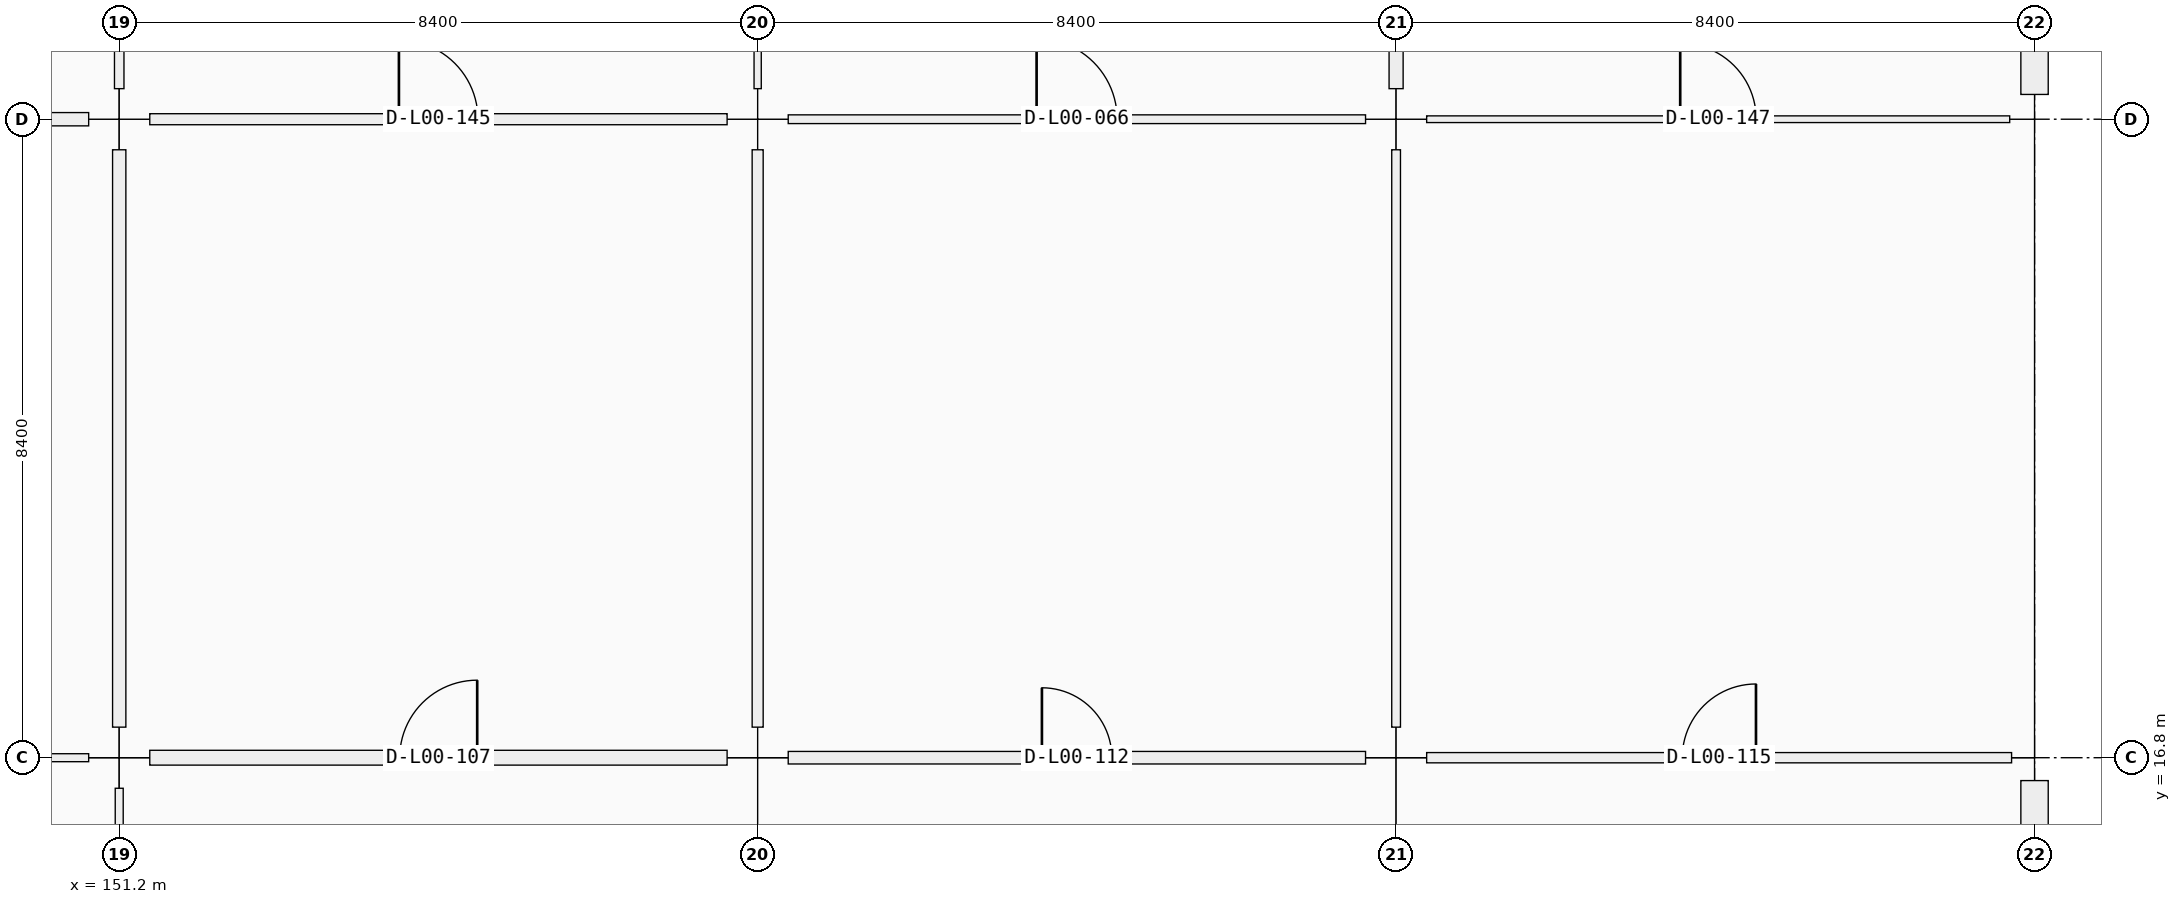
"""IFC4 building model, lengths in metres.
Left out: names, types, materials, properties, quantities, classifications, styles, units other than length and angle.
Written with IfcOpenShell. Run it as: python <this file> out.ifc"""

import sys

from ifc_helpers import new_model, si_unit, direction, frame, frame_2d, origin, origin_2d, place, context, subcontext, project, spatial, rectangle, extrude, element, fill, save


model = new_model("IFC4")
c1 = context("Model", 3, precision=1e-05, world=origin(), true_north=direction((0.0, 1.0)))
c2 = subcontext(c1, "Body", "Model", "MODEL_VIEW")
j1 = project(units=[si_unit("LENGTHUNIT", "METRE"), si_unit("PLANEANGLEUNIT", "RADIAN")], contexts=[c1])
p1 = place(None, origin())
s1 = spatial("IfcSite", under=j1, at=p1, CompositionType="ELEMENT")
p2 = place(p1, origin())
s2 = spatial("IfcBuilding", under=s1, at=p2, CompositionType="ELEMENT")
p3 = place(p2, origin())
s3 = spatial("IfcBuildingStorey", under=s2, at=p3, CompositionType="ELEMENT", Elevation=0.0)
for number, where, z_axis, x_axis in (
    (1, (151.2, 16.8, 0.0), (0.0, 0.0, 1.0), (1.0, 0.0, 0.0)),
    (2, (151.2, 25.2, 0.0), (0.0, 0.0, 1.0), (1.0, 0.0, 0.0)),
    (3, (159.6, 16.8, 0.0), (0.0, 0.0, 1.0), (1.0, 0.0, 0.0)),
    (4, (159.6, 25.2, 0.0), (0.0, 0.0, 1.0), (1.0, 0.0, 0.0)),
    (5, (168.0, 16.8, 0.0), (0.0, 0.0, 1.0), (1.0, 0.0, 0.0)),
    (6, (168.0, 25.2, 0.0), (0.0, 0.0, 1.0), (1.0, 0.0, 0.0)),
):
    element("IfcColumn", number, at=place(p3, frame(where, z_axis=z_axis, x_axis=x_axis)), inside=s3, PredefinedType="COLUMN", context=c2, shape_type="SweptSolid", body=[
        extrude(rectangle(XDim=0.8, YDim=0.8, at=origin_2d()), origin(), (0.0, 0.0, 1.0), 5.76),
    ])
p4 = place(p3, frame((176.4, 16.8, 0.0), z_axis=(0.0, 0.0, 1.0), x_axis=(1.0, 0.0, 0.0)))
e7 = element("IfcColumn", 7, at=p4, inside=s3, PredefinedType="COLUMN", context=c2, shape_type="SweptSolid", body=[
    extrude(rectangle(XDim=0.6, YDim=0.6, at=origin_2d()), origin(), (0.0, 0.0, 1.0), 5.76),
])
p5 = place(p3, frame((176.4, 25.2, 0.0), z_axis=(0.0, 0.0, 1.0), x_axis=(1.0, 0.0, 0.0)))
e8 = element("IfcColumn", 8, at=p5, inside=s3, PredefinedType="COLUMN", context=c2, shape_type="SweptSolid", body=[
    extrude(rectangle(XDim=0.65, YDim=0.65, at=origin_2d()), origin(), (0.0, 0.0, 1.0), 5.76),
])
p6 = place(p3, frame((176.4, 16.499, 0.0), z_axis=(0.0, 0.0, 1.0), x_axis=(0.0, -1.0, 0.0)))
e9 = element("IfcWall", 9, at=p6, inside=s3, PredefinedType="SOLIDWALL", context=c2, shape_type="SweptSolid", body=[
    extrude(rectangle(XDim=7.773, YDim=0.36, at=frame_2d((3.886, 0.0))), origin(), (0.0, 0.0, 1.0), 4.7),
])
p7 = place(p6, frame((2.886, 0.0, 0.9)))
e10 = element("IfcOpeningElement", 10, at=p7, cuts=e9, PredefinedType="OPENING", context=c2, shape_type="SweptSolid", body=[
    extrude(rectangle(XDim=2.0, YDim=2.1, at=frame_2d((1.0, 1.05))), frame((0.0, 0.18, 0.0), z_axis=(0.0, -1.0, 0.0), x_axis=(1.0, 0.0, 0.0)), (0.0, 0.0, 1.0), 0.36),
])
p8 = place(p3, frame((176.4, 33.299, 0.0), z_axis=(0.0, 0.0, 1.0), x_axis=(0.0, -1.0, 0.0)))
e11 = element("IfcWall", 11, at=p8, inside=s3, PredefinedType="SOLIDWALL", context=c2, shape_type="SweptSolid", body=[
    extrude(rectangle(XDim=7.773, YDim=0.36, at=frame_2d((3.887, 0.0))), origin(), (0.0, 0.0, 1.0), 4.7),
])
p9 = place(p8, frame((2.837, 0.0, 0.0)))
e12 = element("IfcOpeningElement", 12, at=p9, cuts=e11, PredefinedType="OPENING", context=c2, shape_type="SweptSolid", body=[
    extrude(rectangle(XDim=2.1, YDim=2.25, at=frame_2d((1.05, 1.125))), frame((0.0, 0.18, 0.0), z_axis=(0.0, -1.0, 0.0), x_axis=(1.0, 0.0, 0.0)), (0.0, 0.0, 1.0), 0.36),
])
p10 = place(p3, frame((143.202, 16.8, 0.0), z_axis=(0.0, 0.0, 1.0), x_axis=(1.0, 0.0, 0.0)))
e13 = element("IfcWall", 13, at=p10, inside=s3, PredefinedType="PARTITIONING", context=c2, shape_type="SweptSolid", body=[
    extrude(rectangle(XDim=7.596, YDim=0.105, at=frame_2d((3.798, 0.0))), origin(), (0.0, 0.0, 1.0), 3.66),
])
p11 = place(p10, frame((3.313, 0.0, 0.0)))
e14 = element("IfcOpeningElement", 14, at=p11, cuts=e13, PredefinedType="OPENING", context=c2, shape_type="SweptSolid", body=[
    extrude(rectangle(XDim=0.97, YDim=2.12, at=frame_2d((0.485, 1.06))), frame((0.0, 0.052, 0.0), z_axis=(0.0, -1.0, 0.0), x_axis=(1.0, 0.0, 0.0)), (0.0, 0.0, 1.0), 0.105),
])
p12 = place(p3, frame((143.202, 25.2, 0.0), z_axis=(0.0, 0.0, 1.0), x_axis=(1.0, 0.0, 0.0)))
e15 = element("IfcWall", 15, at=p12, inside=s3, PredefinedType="PARTITIONING", context=c2, shape_type="SweptSolid", body=[
    extrude(rectangle(XDim=7.596, YDim=0.175, at=frame_2d((3.798, 0.0))), origin(), (0.0, 0.0, 1.0), 3.66),
])
p13 = place(p12, frame((3.333, 0.0, 0.0)))
e16 = element("IfcOpeningElement", 16, at=p13, cuts=e15, PredefinedType="OPENING", context=c2, shape_type="SweptSolid", body=[
    extrude(rectangle(XDim=0.93, YDim=2.12, at=frame_2d((0.465, 1.06))), frame((0.0, 0.087, 0.0), z_axis=(0.0, -1.0, 0.0), x_axis=(1.0, 0.0, 0.0)), (0.0, 0.0, 1.0), 0.175),
])
p14 = place(p3, frame((151.602, 16.8, 0.0), z_axis=(0.0, 0.0, 1.0), x_axis=(1.0, 0.0, 0.0)))
e17 = element("IfcWall", 17, at=p14, inside=s3, PredefinedType="PARTITIONING", context=c2, shape_type="SweptSolid", body=[
    extrude(rectangle(XDim=7.596, YDim=0.195, at=frame_2d((3.798, 0.0))), origin(), (0.0, 0.0, 1.0), 3.66),
])
p15 = place(p14, frame((3.288, 0.0, 0.0)))
e18 = element("IfcOpeningElement", 18, at=p15, cuts=e17, PredefinedType="OPENING", context=c2, shape_type="SweptSolid", body=[
    extrude(rectangle(XDim=1.02, YDim=2.2, at=frame_2d((0.51, 1.1))), frame((0.0, 0.098, 0.0), z_axis=(0.0, -1.0, 0.0), x_axis=(1.0, 0.0, 0.0)), (0.0, 0.0, 1.0), 0.195),
])
p16 = place(p3, frame((151.602, 25.2, 0.0), z_axis=(0.0, 0.0, 1.0), x_axis=(1.0, 0.0, 0.0)))
e19 = element("IfcWall", 19, at=p16, inside=s3, PredefinedType="PARTITIONING", context=c2, shape_type="SweptSolid", body=[
    extrude(rectangle(XDim=7.596, YDim=0.145, at=frame_2d((3.798, 0.0))), origin(), (0.0, 0.0, 1.0), 3.66),
])
p17 = place(p16, frame((3.278, 0.0, 0.0)))
e20 = element("IfcOpeningElement", 20, at=p17, cuts=e19, PredefinedType="OPENING", context=c2, shape_type="SweptSolid", body=[
    extrude(rectangle(XDim=1.04, YDim=2.2, at=frame_2d((0.52, 1.1))), frame((0.0, 0.073, 0.0), z_axis=(0.0, -1.0, 0.0), x_axis=(1.0, 0.0, 0.0)), (0.0, 0.0, 1.0), 0.145),
])
p18 = place(p3, frame((160.002, 16.8, 0.0), z_axis=(0.0, 0.0, 1.0), x_axis=(1.0, 0.0, 0.0)))
e21 = element("IfcWall", 21, at=p18, inside=s3, PredefinedType="PARTITIONING", context=c2, shape_type="SweptSolid", body=[
    extrude(rectangle(XDim=7.596, YDim=0.165, at=frame_2d((3.798, 0.0))), origin(), (0.0, 0.0, 1.0), 3.66),
])
p19 = place(p18, frame((3.338, 0.0, 0.0)))
e22 = element("IfcOpeningElement", 22, at=p19, cuts=e21, PredefinedType="OPENING", context=c2, shape_type="SweptSolid", body=[
    extrude(rectangle(XDim=0.92, YDim=2.15, at=frame_2d((0.46, 1.075))), frame((0.0, 0.083, 0.0), z_axis=(0.0, -1.0, 0.0), x_axis=(1.0, 0.0, 0.0)), (0.0, 0.0, 1.0), 0.165),
])
p20 = place(p3, frame((160.002, 25.2, 0.0), z_axis=(0.0, 0.0, 1.0), x_axis=(1.0, 0.0, 0.0)))
e23 = element("IfcWall", 23, at=p20, inside=s3, PredefinedType="PARTITIONING", context=c2, shape_type="SweptSolid", body=[
    extrude(rectangle(XDim=7.596, YDim=0.115, at=frame_2d((3.798, 0.0))), origin(), (0.0, 0.0, 1.0), 3.66),
])
p21 = place(p20, frame((3.268, 0.0, 0.0)))
e24 = element("IfcOpeningElement", 24, at=p21, cuts=e23, PredefinedType="OPENING", context=c2, shape_type="SweptSolid", body=[
    extrude(rectangle(XDim=1.06, YDim=2.25, at=frame_2d((0.53, 1.125))), frame((0.0, 0.058, 0.0), z_axis=(0.0, -1.0, 0.0), x_axis=(1.0, 0.0, 0.0)), (0.0, 0.0, 1.0), 0.115),
])
p22 = place(p3, frame((168.402, 16.8, 0.0), z_axis=(0.0, 0.0, 1.0), x_axis=(1.0, 0.0, 0.0)))
e25 = element("IfcWall", 25, at=p22, inside=s3, PredefinedType="PARTITIONING", context=c2, shape_type="SweptSolid", body=[
    extrude(rectangle(XDim=7.696, YDim=0.135, at=frame_2d((3.848, 0.0))), origin(), (0.0, 0.0, 1.0), 3.66),
])
p23 = place(p22, frame((3.363, 0.0, 0.0)))
e26 = element("IfcOpeningElement", 26, at=p23, cuts=e25, PredefinedType="OPENING", context=c2, shape_type="SweptSolid", body=[
    extrude(rectangle(XDim=0.97, YDim=2.12, at=frame_2d((0.485, 1.06))), frame((0.0, 0.067, 0.0), z_axis=(0.0, -1.0, 0.0), x_axis=(1.0, 0.0, 0.0)), (0.0, 0.0, 1.0), 0.135),
])
p24 = place(p3, frame((168.402, 25.2, 0.0), z_axis=(0.0, 0.0, 1.0), x_axis=(1.0, 0.0, 0.0)))
e27 = element("IfcWall", 27, at=p24, inside=s3, PredefinedType="PARTITIONING", context=c2, shape_type="SweptSolid", body=[
    extrude(rectangle(XDim=7.671, YDim=0.088, at=frame_2d((3.835, 0.0))), origin(), (0.0, 0.0, 1.0), 3.66),
])
p25 = place(p24, frame((3.336, 0.0, 0.0)))
e28 = element("IfcOpeningElement", 28, at=p25, cuts=e27, PredefinedType="OPENING", context=c2, shape_type="SweptSolid", body=[
    extrude(rectangle(XDim=1.0, YDim=2.2, at=frame_2d((0.5, 1.1))), frame((0.0, 0.044, 0.0), z_axis=(0.0, -1.0, 0.0), x_axis=(1.0, 0.0, 0.0)), (0.0, 0.0, 1.0), 0.088),
])
p26 = place(p3, frame((151.2, 8.752, 0.0), z_axis=(0.0, 0.0, 1.0), x_axis=(0.0, 1.0, 0.0)))
e29 = element("IfcWall", 29, at=p26, inside=s3, PredefinedType="PARTITIONING", context=c2, shape_type="SweptSolid", body=[
    extrude(rectangle(XDim=7.646, YDim=0.105, at=frame_2d((3.823, 0.0))), origin(), (0.0, 0.0, 1.0), 3.66),
])
p27 = place(p26, frame((3.358, 0.0, 0.0)))
e30 = element("IfcOpeningElement", 30, at=p27, cuts=e29, PredefinedType="OPENING", context=c2, shape_type="SweptSolid", body=[
    extrude(rectangle(XDim=0.93, YDim=2.12, at=frame_2d((0.465, 1.06))), frame((0.0, 0.052, 0.0), z_axis=(0.0, -1.0, 0.0), x_axis=(1.0, 0.0, 0.0)), (0.0, 0.0, 1.0), 0.105),
])
p28 = place(p3, frame((151.2, 17.202, 0.0), z_axis=(0.0, 0.0, 1.0), x_axis=(0.0, 1.0, 0.0)))
e31 = element("IfcWall", 31, at=p28, inside=s3, PredefinedType="PARTITIONING", context=c2, shape_type="SweptSolid", body=[
    extrude(rectangle(XDim=7.596, YDim=0.175, at=frame_2d((3.798, 0.0))), origin(), (0.0, 0.0, 1.0), 3.66),
])
p29 = place(p28, frame((3.278, 0.0, 0.0)))
e32 = element("IfcOpeningElement", 32, at=p29, cuts=e31, PredefinedType="OPENING", context=c2, shape_type="SweptSolid", body=[
    extrude(rectangle(XDim=1.04, YDim=2.2, at=frame_2d((0.52, 1.1))), frame((0.0, 0.087, 0.0), z_axis=(0.0, -1.0, 0.0), x_axis=(1.0, 0.0, 0.0)), (0.0, 0.0, 1.0), 0.175),
])
p30 = place(p3, frame((151.2, 25.602, 0.0), z_axis=(0.0, 0.0, 1.0), x_axis=(0.0, 1.0, 0.0)))
e33 = element("IfcWall", 33, at=p30, inside=s3, PredefinedType="PARTITIONING", context=c2, shape_type="SweptSolid", body=[
    extrude(rectangle(XDim=7.621, YDim=0.125, at=frame_2d((3.811, 0.0))), origin(), (0.0, 0.0, 1.0), 3.66),
])
p31 = place(p30, frame((3.301, 0.0, 0.0)))
e34 = element("IfcOpeningElement", 34, at=p31, cuts=e33, PredefinedType="OPENING", context=c2, shape_type="SweptSolid", body=[
    extrude(rectangle(XDim=1.02, YDim=2.2, at=frame_2d((0.51, 1.1))), frame((0.0, 0.062, 0.0), z_axis=(0.0, -1.0, 0.0), x_axis=(1.0, 0.0, 0.0)), (0.0, 0.0, 1.0), 0.125),
])
p32 = place(p3, frame((159.6, 17.202, 0.0), z_axis=(0.0, 0.0, 1.0), x_axis=(0.0, 1.0, 0.0)))
e35 = element("IfcWall", 35, at=p32, inside=s3, PredefinedType="PARTITIONING", context=c2, shape_type="SweptSolid", body=[
    extrude(rectangle(XDim=7.596, YDim=0.145, at=frame_2d((3.798, 0.0))), origin(), (0.0, 0.0, 1.0), 3.66),
])
p33 = place(p32, frame((3.273, 0.0, 0.0)))
e36 = element("IfcOpeningElement", 36, at=p33, cuts=e35, PredefinedType="OPENING", context=c2, shape_type="SweptSolid", body=[
    extrude(rectangle(XDim=1.05, YDim=2.12, at=frame_2d((0.525, 1.06))), frame((0.0, 0.073, 0.0), z_axis=(0.0, -1.0, 0.0), x_axis=(1.0, 0.0, 0.0)), (0.0, 0.0, 1.0), 0.145),
])
p34 = place(p3, frame((159.6, 25.602, 0.0), z_axis=(0.0, 0.0, 1.0), x_axis=(0.0, 1.0, 0.0)))
e37 = element("IfcWall", 37, at=p34, inside=s3, PredefinedType="PARTITIONING", context=c2, shape_type="SweptSolid", body=[
    extrude(rectangle(XDim=7.596, YDim=0.095, at=frame_2d((3.798, 0.0))), origin(), (0.0, 0.0, 1.0), 3.66),
])
p35 = place(p34, frame((3.328, 0.0, 0.0)))
e38 = element("IfcOpeningElement", 38, at=p35, cuts=e37, PredefinedType="OPENING", context=c2, shape_type="SweptSolid", body=[
    extrude(rectangle(XDim=0.94, YDim=2.15, at=frame_2d((0.47, 1.075))), frame((0.0, 0.047, 0.0), z_axis=(0.0, -1.0, 0.0), x_axis=(1.0, 0.0, 0.0)), (0.0, 0.0, 1.0), 0.095),
])
p36 = place(p3, frame((168.0, 17.202, 0.0), z_axis=(0.0, 0.0, 1.0), x_axis=(0.0, 1.0, 0.0)))
e39 = element("IfcWall", 39, at=p36, inside=s3, PredefinedType="PARTITIONING", context=c2, shape_type="SweptSolid", body=[
    extrude(rectangle(XDim=7.596, YDim=0.115, at=frame_2d((3.798, 0.0))), origin(), (0.0, 0.0, 1.0), 3.66),
])
p37 = place(p36, frame((3.333, 0.0, 0.0)))
e40 = element("IfcOpeningElement", 40, at=p37, cuts=e39, PredefinedType="OPENING", context=c2, shape_type="SweptSolid", body=[
    extrude(rectangle(XDim=0.93, YDim=2.12, at=frame_2d((0.465, 1.06))), frame((0.0, 0.058, 0.0), z_axis=(0.0, -1.0, 0.0), x_axis=(1.0, 0.0, 0.0)), (0.0, 0.0, 1.0), 0.115),
])
p38 = place(p3, frame((168.0, 25.602, 0.0), z_axis=(0.0, 0.0, 1.0), x_axis=(0.0, 1.0, 0.0)))
e41 = element("IfcWall", 41, at=p38, inside=s3, PredefinedType="PARTITIONING", context=c2, shape_type="SweptSolid", body=[
    extrude(rectangle(XDim=7.596, YDim=0.185, at=frame_2d((3.798, 0.0))), origin(), (0.0, 0.0, 1.0), 3.66),
])
p39 = place(p38, frame((3.293, 0.0, 0.0)))
e42 = element("IfcOpeningElement", 42, at=p39, cuts=e41, PredefinedType="OPENING", context=c2, shape_type="SweptSolid", body=[
    extrude(rectangle(XDim=1.01, YDim=2.12, at=frame_2d((0.505, 1.06))), frame((0.0, 0.093, 0.0), z_axis=(0.0, -1.0, 0.0), x_axis=(1.0, 0.0, 0.0)), (0.0, 0.0, 1.0), 0.185),
])
p40 = place(p21, origin())
e43 = element("IfcDoor", 43, at=p40, inside=s3, OperationType="SINGLE_SWING_LEFT", PredefinedType="DOOR", context=c2, shape_type="SweptSolid", body=[
    extrude(rectangle(XDim=1.06, YDim=2.25, at=frame_2d((0.53, 1.125))), frame((0.0, 0.025, 0.0), z_axis=(0.0, -1.0, 0.0), x_axis=(1.0, 0.0, 0.0)), (0.0, 0.0, 1.0), 0.05),
])
fill(e24, e43)
p41 = place(p15, origin())
e44 = element("IfcDoor", 44, at=p41, inside=s3, OperationType="SINGLE_SWING_RIGHT", PredefinedType="DOOR", context=c2, shape_type="SweptSolid", body=[
    extrude(rectangle(XDim=1.02, YDim=2.2, at=frame_2d((0.51, 1.1))), frame((0.0, 0.025, 0.0), z_axis=(0.0, -1.0, 0.0), x_axis=(1.0, 0.0, 0.0)), (0.0, 0.0, 1.0), 0.05),
])
fill(e18, e44)
p42 = place(p19, origin())
e45 = element("IfcDoor", 45, at=p42, inside=s3, OperationType="SINGLE_SWING_LEFT", PredefinedType="DOOR", context=c2, shape_type="SweptSolid", body=[
    extrude(rectangle(XDim=0.92, YDim=2.15, at=frame_2d((0.46, 1.075))), frame((0.0, 0.025, 0.0), z_axis=(0.0, -1.0, 0.0), x_axis=(1.0, 0.0, 0.0)), (0.0, 0.0, 1.0), 0.05),
])
fill(e22, e45)
p43 = place(p23, origin())
e46 = element("IfcDoor", 46, at=p43, inside=s3, OperationType="SINGLE_SWING_RIGHT", PredefinedType="DOOR", context=c2, shape_type="SweptSolid", body=[
    extrude(rectangle(XDim=0.97, YDim=2.12, at=frame_2d((0.485, 1.06))), frame((0.0, 0.025, 0.0), z_axis=(0.0, -1.0, 0.0), x_axis=(1.0, 0.0, 0.0)), (0.0, 0.0, 1.0), 0.05),
])
fill(e26, e46)
p44 = place(p17, origin())
e47 = element("IfcDoor", 47, at=p44, inside=s3, OperationType="SINGLE_SWING_LEFT", PredefinedType="DOOR", context=c2, shape_type="SweptSolid", body=[
    extrude(rectangle(XDim=1.04, YDim=2.2, at=frame_2d((0.52, 1.1))), frame((0.0, 0.025, 0.0), z_axis=(0.0, -1.0, 0.0), x_axis=(1.0, 0.0, 0.0)), (0.0, 0.0, 1.0), 0.05),
])
fill(e20, e47)
p45 = place(p25, origin())
e48 = element("IfcDoor", 48, at=p45, inside=s3, OperationType="SINGLE_SWING_LEFT", PredefinedType="DOOR", context=c2, shape_type="SweptSolid", body=[
    extrude(rectangle(XDim=1.0, YDim=2.2, at=frame_2d((0.5, 1.1))), frame((0.0, 0.025, 0.0), z_axis=(0.0, -1.0, 0.0), x_axis=(1.0, 0.0, 0.0)), (0.0, 0.0, 1.0), 0.05),
])
fill(e28, e48)
p46 = place(p29, origin())
e49 = element("IfcDoor", 49, at=p46, inside=s3, OperationType="SINGLE_SWING_RIGHT", PredefinedType="DOOR", context=c2, shape_type="SweptSolid", body=[
    extrude(rectangle(XDim=1.04, YDim=2.2, at=frame_2d((0.52, 1.1))), frame((0.0, 0.025, 0.0), z_axis=(0.0, -1.0, 0.0), x_axis=(1.0, 0.0, 0.0)), (0.0, 0.0, 1.0), 0.05),
])
fill(e32, e49)
p47 = place(p33, origin())
e50 = element("IfcDoor", 50, at=p47, inside=s3, OperationType="SINGLE_SWING_LEFT", PredefinedType="DOOR", context=c2, shape_type="SweptSolid", body=[
    extrude(rectangle(XDim=1.05, YDim=2.12, at=frame_2d((0.525, 1.06))), frame((0.0, 0.025, 0.0), z_axis=(0.0, -1.0, 0.0), x_axis=(1.0, 0.0, 0.0)), (0.0, 0.0, 1.0), 0.05),
])
fill(e36, e50)
p48 = place(p37, origin())
e51 = element("IfcDoor", 51, at=p48, inside=s3, OperationType="SINGLE_SWING_RIGHT", PredefinedType="DOOR", context=c2, shape_type="SweptSolid", body=[
    extrude(rectangle(XDim=0.93, YDim=2.12, at=frame_2d((0.465, 1.06))), frame((0.0, 0.025, 0.0), z_axis=(0.0, -1.0, 0.0), x_axis=(1.0, 0.0, 0.0)), (0.0, 0.0, 1.0), 0.05),
])
fill(e40, e51)
save(model, sys.argv[1])
